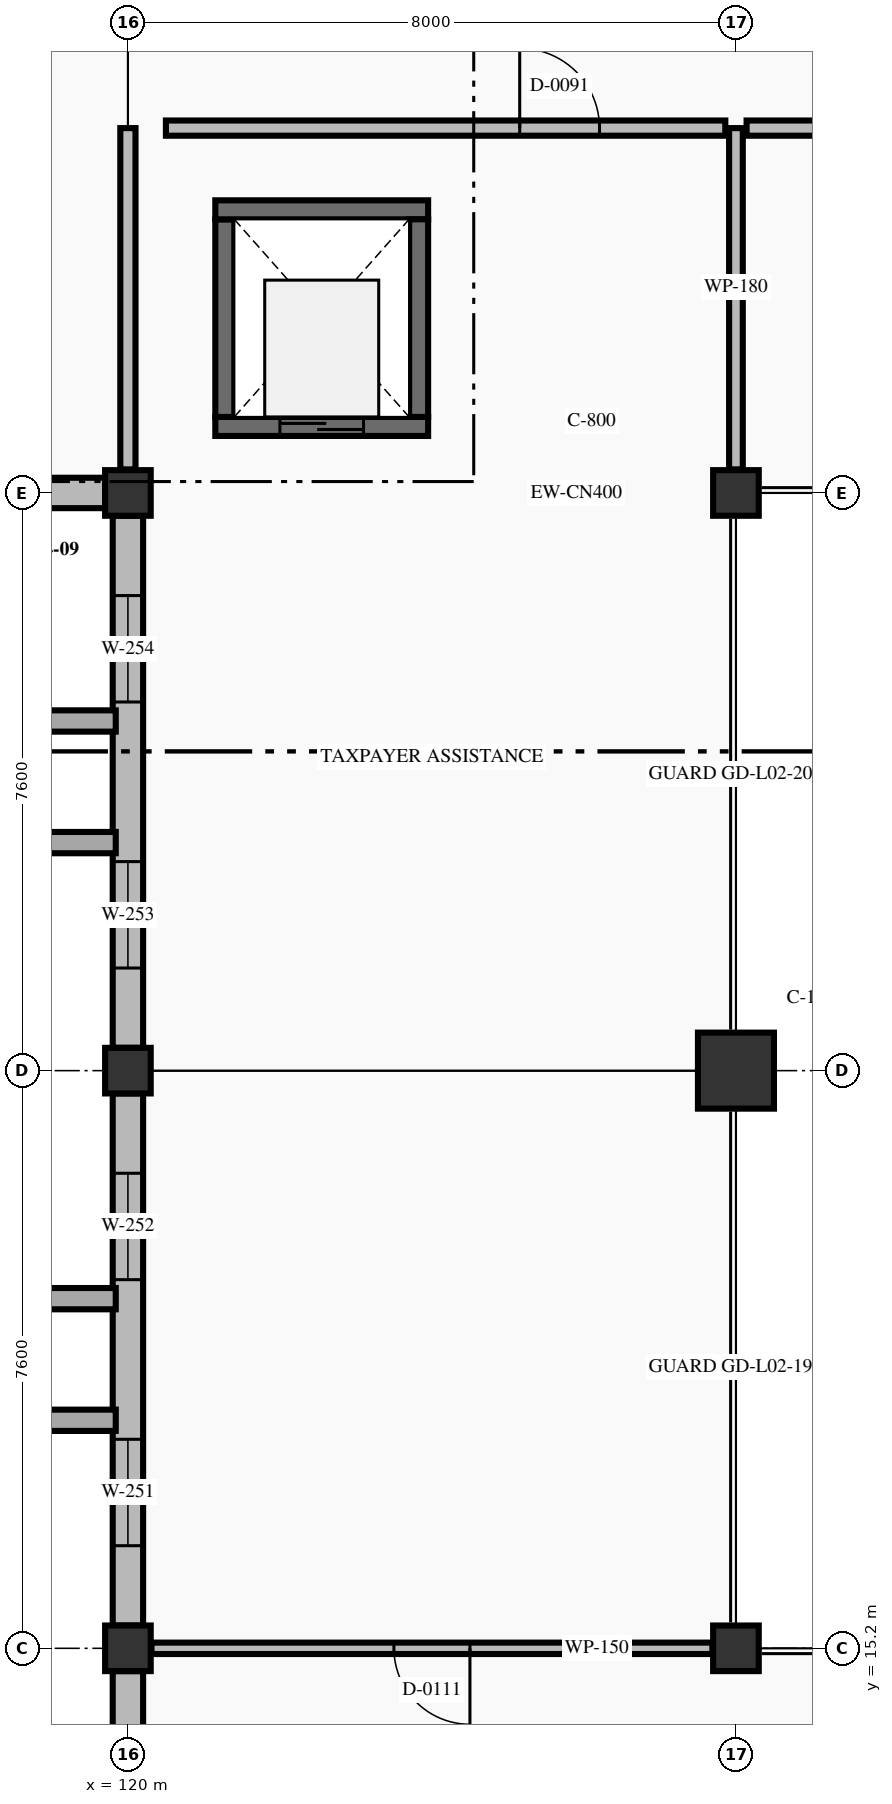
"""IFC4 building model, lengths in metres.
Left out: names, types, materials, properties, quantities, classifications, styles, units other than length and angle.
Written with IfcOpenShell. Run it as: python <this file> out.ifc"""

import sys

from ifc_helpers import new_model, si_unit, direction, frame, frame_2d, origin, origin_2d, place, context, subcontext, project, spatial, rectangle, extrude, element, fill, save


model = new_model("IFC4")
c1 = context("Model", 3, precision=1e-05, world=origin(), true_north=direction((0.0, 1.0)))
c2 = subcontext(c1, "Body", "Model", "MODEL_VIEW")
j1 = project(units=[si_unit("LENGTHUNIT", "METRE"), si_unit("PLANEANGLEUNIT", "RADIAN")], contexts=[c1])
p1 = place(None, origin())
s1 = spatial("IfcSite", under=j1, at=p1, CompositionType="ELEMENT")
p2 = place(p1, origin())
s2 = spatial("IfcBuilding", under=s1, at=p2, CompositionType="ELEMENT")
p3 = place(p2, frame((0.0, 0.0, 5.4)))
s3 = spatial("IfcBuildingStorey", under=s2, at=p3, CompositionType="ELEMENT", Elevation=5.4)
for number, where, z_axis, x_axis in (
    (1, (120.0, 15.2, 0.0), (0.0, 0.0, 1.0), (1.0, 0.0, 0.0)),
    (2, (120.0, 22.8, 0.0), (0.0, 0.0, 1.0), (1.0, 0.0, 0.0)),
    (3, (120.0, 30.4, 0.0), (0.0, 0.0, 1.0), (1.0, 0.0, 0.0)),
    (4, (128.0, 15.2, 0.0), (0.0, 0.0, 1.0), (1.0, 0.0, 0.0)),
):
    element("IfcColumn", number, at=place(p3, frame(where, z_axis=z_axis, x_axis=x_axis)), inside=s3, PredefinedType="COLUMN", context=c2, shape_type="SweptSolid", body=[
        extrude(rectangle(XDim=0.6, YDim=0.6, at=origin_2d()), origin(), (0.0, 0.0, 1.0), 4.8),
    ])
p4 = place(p3, frame((128.0, 22.8, 0.0), z_axis=(0.0, 0.0, 1.0), x_axis=(1.0, 0.0, 0.0)))
e5 = element("IfcColumn", 5, at=p4, inside=s3, PredefinedType="COLUMN", context=c2, shape_type="SweptSolid", body=[
    extrude(rectangle(XDim=1.0, YDim=1.0, at=origin_2d()), origin(), (0.0, 0.0, 1.0), 4.8),
])
p5 = place(p3, frame((128.0, 30.4, 0.0), z_axis=(0.0, 0.0, 1.0), x_axis=(1.0, 0.0, 0.0)))
e6 = element("IfcColumn", 6, at=p5, inside=s3, PredefinedType="COLUMN", context=c2, shape_type="SweptSolid", body=[
    extrude(rectangle(XDim=0.6, YDim=0.6, at=origin_2d()), origin(), (0.0, 0.0, 1.0), 4.8),
])
p6 = place(p3, frame((120.0, 7.9, 0.0), z_axis=(0.0, 0.0, 1.0), x_axis=(0.0, 1.0, 0.0)))
e7 = element("IfcWall", 7, at=p6, inside=s3, PredefinedType="STANDARD", context=c2, shape_type="SweptSolid", body=[
    extrude(rectangle(XDim=7.0, YDim=0.4, at=frame_2d((3.5, 0.0))), origin(), (0.0, 0.0, 1.0), 3.87),
])
p7 = place(p6, frame((1.05, 0.0, 0.9)))
e8 = element("IfcOpeningElement", 8, at=p7, cuts=e7, PredefinedType="OPENING", context=c2, shape_type="SweptSolid", body=[
    extrude(rectangle(XDim=1.4, YDim=2.05, at=frame_2d((0.7, 1.025))), frame((0.0, 0.21, 0.0), z_axis=(0.0, -1.0, 0.0), x_axis=(1.0, 0.0, 0.0)), (0.0, 0.0, 1.0), 0.42),
])
p8 = place(p6, frame((4.55, 0.0, 0.9)))
e9 = element("IfcOpeningElement", 9, at=p8, cuts=e7, PredefinedType="OPENING", context=c2, shape_type="SweptSolid", body=[
    extrude(rectangle(XDim=1.4, YDim=2.05, at=frame_2d((0.7, 1.025))), frame((0.0, 0.21, 0.0), z_axis=(0.0, -1.0, 0.0), x_axis=(1.0, 0.0, 0.0)), (0.0, 0.0, 1.0), 0.42),
])
p9 = place(p3, frame((120.0, 15.5, 0.0), z_axis=(0.0, 0.0, 1.0), x_axis=(0.0, 1.0, 0.0)))
e10 = element("IfcWall", 10, at=p9, inside=s3, PredefinedType="STANDARD", context=c2, shape_type="SweptSolid", body=[
    extrude(rectangle(XDim=7.0, YDim=0.4, at=frame_2d((3.5, 0.0))), origin(), (0.0, 0.0, 1.0), 3.87),
])
p10 = place(p9, frame((1.05, 0.0, 0.9)))
e11 = element("IfcOpeningElement", 11, at=p10, cuts=e10, PredefinedType="OPENING", context=c2, shape_type="SweptSolid", body=[
    extrude(rectangle(XDim=1.4, YDim=2.05, at=frame_2d((0.7, 1.025))), frame((0.0, 0.21, 0.0), z_axis=(0.0, -1.0, 0.0), x_axis=(1.0, 0.0, 0.0)), (0.0, 0.0, 1.0), 0.42),
])
p11 = place(p9, frame((4.55, 0.0, 0.9)))
e12 = element("IfcOpeningElement", 12, at=p11, cuts=e10, PredefinedType="OPENING", context=c2, shape_type="SweptSolid", body=[
    extrude(rectangle(XDim=1.4, YDim=2.05, at=frame_2d((0.7, 1.025))), frame((0.0, 0.21, 0.0), z_axis=(0.0, -1.0, 0.0), x_axis=(1.0, 0.0, 0.0)), (0.0, 0.0, 1.0), 0.42),
])
p12 = place(p3, frame((120.0, 23.1, 0.0), z_axis=(0.0, 0.0, 1.0), x_axis=(0.0, 1.0, 0.0)))
e13 = element("IfcWall", 13, at=p12, inside=s3, PredefinedType="STANDARD", context=c2, shape_type="SweptSolid", body=[
    extrude(rectangle(XDim=7.0, YDim=0.4, at=frame_2d((3.5, 0.0))), origin(), (0.0, 0.0, 1.0), 3.87),
])
p13 = place(p12, frame((1.05, 0.0, 0.9)))
e14 = element("IfcOpeningElement", 14, at=p13, cuts=e13, PredefinedType="OPENING", context=c2, shape_type="SweptSolid", body=[
    extrude(rectangle(XDim=1.4, YDim=2.05, at=frame_2d((0.7, 1.025))), frame((0.0, 0.21, 0.0), z_axis=(0.0, -1.0, 0.0), x_axis=(1.0, 0.0, 0.0)), (0.0, 0.0, 1.0), 0.42),
])
p14 = place(p12, frame((4.55, 0.0, 0.9)))
e15 = element("IfcOpeningElement", 15, at=p14, cuts=e13, PredefinedType="OPENING", context=c2, shape_type="SweptSolid", body=[
    extrude(rectangle(XDim=1.4, YDim=2.05, at=frame_2d((0.7, 1.025))), frame((0.0, 0.21, 0.0), z_axis=(0.0, -1.0, 0.0), x_axis=(1.0, 0.0, 0.0)), (0.0, 0.0, 1.0), 0.42),
])
p15 = place(p3, frame((119.7, 30.4, 0.0), z_axis=(0.0, 0.0, 1.0), x_axis=(-1.0, 0.0, 0.0)))
e16 = element("IfcWall", 16, at=p15, inside=s3, PredefinedType="STANDARD", context=c2, shape_type="SweptSolid", body=[
    extrude(rectangle(XDim=7.3, YDim=0.4, at=frame_2d((3.65, 0.0))), origin(), (0.0, 0.0, 1.0), 3.85),
])
p16 = place(p15, frame((1.025, 0.0, 0.9)))
e17 = element("IfcOpeningElement", 17, at=p16, cuts=e16, PredefinedType="OPENING", context=c2, shape_type="SweptSolid", body=[
    extrude(rectangle(XDim=1.6, YDim=2.25, at=frame_2d((0.8, 1.125))), frame((0.0, 0.21, 0.0), z_axis=(0.0, -1.0, 0.0), x_axis=(1.0, 0.0, 0.0)), (0.0, 0.0, 1.0), 0.42),
])
p17 = place(p15, frame((4.675, 0.0, 0.9)))
e18 = element("IfcOpeningElement", 18, at=p17, cuts=e16, PredefinedType="OPENING", context=c2, shape_type="SweptSolid", body=[
    extrude(rectangle(XDim=1.6, YDim=2.25, at=frame_2d((0.8, 1.125))), frame((0.0, 0.21, 0.0), z_axis=(0.0, -1.0, 0.0), x_axis=(1.0, 0.0, 0.0)), (0.0, 0.0, 1.0), 0.42),
])
p18 = place(p3, frame((123.95, 31.275, 0.0), z_axis=(0.0, 0.0, 1.0), x_axis=(-1.0, 0.0, 0.0)))
e19 = element("IfcWall", 19, at=p18, inside=s3, PredefinedType="SHEAR", context=c2, shape_type="SweptSolid", body=[
    extrude(rectangle(XDim=2.8, YDim=0.25, at=frame_2d((1.4, 0.0))), origin(), (0.0, 0.0, 1.0), 4.8),
])
p19 = place(p18, frame((0.85, 0.0, 0.0)))
e20 = element("IfcOpeningElement", 20, at=p19, cuts=e19, PredefinedType="OPENING", context=c2, shape_type="SweptSolid", body=[
    extrude(rectangle(XDim=1.1, YDim=2.15, at=frame_2d((0.55, 1.075))), frame((0.0, 0.135, 0.0), z_axis=(0.0, -1.0, 0.0), x_axis=(1.0, 0.0, 0.0)), (0.0, 0.0, 1.0), 0.27),
])
p20 = place(p3, frame((121.275, 31.4, 0.0), z_axis=(0.0, 0.0, 1.0), x_axis=(0.0, 1.0, 0.0)))
e21 = element("IfcWall", 21, at=p20, inside=s3, PredefinedType="SHEAR", context=c2, shape_type="SweptSolid", body=[
    extrude(rectangle(XDim=2.6, YDim=0.25, at=frame_2d((1.3, 0.0))), origin(), (0.0, 0.0, 1.0), 4.8),
])
p21 = place(p3, frame((121.15, 34.125, 0.0), z_axis=(0.0, 0.0, 1.0), x_axis=(1.0, 0.0, 0.0)))
e22 = element("IfcWall", 22, at=p21, inside=s3, PredefinedType="SHEAR", context=c2, shape_type="SweptSolid", body=[
    extrude(rectangle(XDim=2.8, YDim=0.25, at=frame_2d((1.4, 0.0))), origin(), (0.0, 0.0, 1.0), 4.8),
])
p22 = place(p3, frame((123.825, 34.0, 0.0), z_axis=(0.0, 0.0, 1.0), x_axis=(0.0, -1.0, 0.0)))
e23 = element("IfcWall", 23, at=p22, inside=s3, PredefinedType="SHEAR", context=c2, shape_type="SweptSolid", body=[
    extrude(rectangle(XDim=2.6, YDim=0.25, at=frame_2d((1.3, 0.0))), origin(), (0.0, 0.0, 1.0), 4.8),
])
p23 = place(p3, frame((128.0, 30.71, 0.0), z_axis=(0.0, 0.0, 1.0), x_axis=(0.0, 1.0, 0.0)))
e24 = element("IfcWall", 24, at=p23, inside=s3, PredefinedType="PARTITIONING", context=c2, shape_type="SweptSolid", body=[
    extrude(rectangle(XDim=4.49, YDim=0.18, at=frame_2d((2.245, 0.0))), origin(), (0.0, 0.0, 1.0), 3.87),
])
p24 = place(p3, frame((128.14, 35.2, 0.0), z_axis=(0.0, 0.0, 1.0), x_axis=(1.0, 0.0, 0.0)))
e25 = element("IfcWall", 25, at=p24, inside=s3, PredefinedType="STANDARD", context=c2, shape_type="SweptSolid", body=[
    extrude(rectangle(XDim=15.72, YDim=0.2, at=frame_2d((7.86, 0.0))), origin(), (0.0, 0.0, 1.0), 4.45),
])
p25 = place(p24, frame((7.06, 0.0, 0.0)))
e26 = element("IfcOpeningElement", 26, at=p25, cuts=e25, PredefinedType="OPENING", context=c2, shape_type="SweptSolid", body=[
    extrude(rectangle(XDim=1.6, YDim=2.3, at=frame_2d((0.8, 1.15))), frame((0.0, 0.11, 0.0), z_axis=(0.0, -1.0, 0.0), x_axis=(1.0, 0.0, 0.0)), (0.0, 0.0, 1.0), 0.22),
])
p26 = place(p24, frame((8.81, 0.0, 0.0)))
e27 = element("IfcOpeningElement", 27, at=p26, cuts=e25, PredefinedType="OPENING", context=c2, shape_type="SweptSolid", body=[
    extrude(rectangle(XDim=1.6, YDim=2.3, at=frame_2d((0.8, 1.15))), frame((0.0, 0.11, 0.0), z_axis=(0.0, -1.0, 0.0), x_axis=(1.0, 0.0, 0.0)), (0.0, 0.0, 1.0), 0.22),
])
p27 = place(p3, frame((127.69, 15.2, 0.0), z_axis=(0.0, 0.0, 1.0), x_axis=(-1.0, 0.0, 0.0)))
e28 = element("IfcWall", 28, at=p27, inside=s3, PredefinedType="PARTITIONING", context=c2, shape_type="SweptSolid", body=[
    extrude(rectangle(XDim=7.38, YDim=0.15, at=frame_2d((3.69, 0.0))), origin(), (0.0, 0.0, 1.0), 3.8),
])
p28 = place(p27, frame((3.19, 0.0, 0.0)))
e29 = element("IfcOpeningElement", 29, at=p28, cuts=e28, PredefinedType="OPENING", context=c2, shape_type="SweptSolid", body=[
    extrude(rectangle(XDim=1.0, YDim=2.15, at=frame_2d((0.5, 1.075))), frame((0.0, 0.085, 0.0), z_axis=(0.0, -1.0, 0.0), x_axis=(1.0, 0.0, 0.0)), (0.0, 0.0, 1.0), 0.17),
])
p29 = place(p3, frame((120.0, 30.71, 0.0), z_axis=(0.0, 0.0, 1.0), x_axis=(0.0, 1.0, 0.0)))
e30 = element("IfcWall", 30, at=p29, inside=s3, PredefinedType="STANDARD", context=c2, shape_type="SweptSolid", body=[
    extrude(rectangle(XDim=4.49, YDim=0.2, at=frame_2d((2.245, 0.0))), origin(), (0.0, 0.0, 1.0), 3.87),
])
p30 = place(p3, frame((120.5, 35.2, 0.0), z_axis=(0.0, 0.0, 1.0), x_axis=(1.0, 0.0, 0.0)))
e31 = element("IfcWall", 31, at=p30, inside=s3, PredefinedType="STANDARD", context=c2, shape_type="SweptSolid", body=[
    extrude(rectangle(XDim=7.36, YDim=0.2, at=frame_2d((3.68, 0.0))), origin(), (0.0, 0.0, 1.0), 4.45),
])
p31 = place(p30, frame((4.655, 0.0, 0.0)))
e32 = element("IfcOpeningElement", 32, at=p31, cuts=e31, PredefinedType="OPENING", context=c2, shape_type="SweptSolid", body=[
    extrude(rectangle(XDim=1.05, YDim=2.15, at=frame_2d((0.525, 1.075))), frame((0.0, 0.11, 0.0), z_axis=(0.0, -1.0, 0.0), x_axis=(1.0, 0.0, 0.0)), (0.0, 0.0, 1.0), 0.22),
])
p32 = place(p10, origin())
e33 = element("IfcWindow", 33, at=p32, inside=s3, PartitioningType="DOUBLE_PANEL_VERTICAL", PredefinedType="WINDOW", context=c2, shape_type="SweptSolid", body=[
    extrude(rectangle(XDim=1.4, YDim=2.05, at=frame_2d((0.7, 1.025))), frame((0.0, 0.03, 0.0), z_axis=(0.0, -1.0, 0.0), x_axis=(1.0, 0.0, 0.0)), (0.0, 0.0, 1.0), 0.06),
])
fill(e11, e33)
p33 = place(p11, origin())
e34 = element("IfcWindow", 34, at=p33, inside=s3, PartitioningType="DOUBLE_PANEL_VERTICAL", PredefinedType="WINDOW", context=c2, shape_type="SweptSolid", body=[
    extrude(rectangle(XDim=1.4, YDim=2.05, at=frame_2d((0.7, 1.025))), frame((0.0, 0.03, 0.0), z_axis=(0.0, -1.0, 0.0), x_axis=(1.0, 0.0, 0.0)), (0.0, 0.0, 1.0), 0.06),
])
fill(e12, e34)
p34 = place(p13, origin())
e35 = element("IfcWindow", 35, at=p34, inside=s3, PartitioningType="DOUBLE_PANEL_VERTICAL", PredefinedType="WINDOW", context=c2, shape_type="SweptSolid", body=[
    extrude(rectangle(XDim=1.4, YDim=2.05, at=frame_2d((0.7, 1.025))), frame((0.0, 0.03, 0.0), z_axis=(0.0, -1.0, 0.0), x_axis=(1.0, 0.0, 0.0)), (0.0, 0.0, 1.0), 0.06),
])
fill(e14, e35)
p35 = place(p14, origin())
e36 = element("IfcWindow", 36, at=p35, inside=s3, PartitioningType="DOUBLE_PANEL_VERTICAL", PredefinedType="WINDOW", context=c2, shape_type="SweptSolid", body=[
    extrude(rectangle(XDim=1.4, YDim=2.05, at=frame_2d((0.7, 1.025))), frame((0.0, 0.03, 0.0), z_axis=(0.0, -1.0, 0.0), x_axis=(1.0, 0.0, 0.0)), (0.0, 0.0, 1.0), 0.06),
])
fill(e15, e36)
p36 = place(p19, origin())
e37 = element("IfcDoor", 37, at=p36, inside=s3, OperationType="DOUBLE_DOOR_SLIDING", PredefinedType="DOOR", context=c2, shape_type="SweptSolid", body=[
    extrude(rectangle(XDim=1.1, YDim=2.15, at=frame_2d((0.55, 1.075))), frame((0.0, 0.025, 0.0), z_axis=(0.0, -1.0, 0.0), x_axis=(1.0, 0.0, 0.0)), (0.0, 0.0, 1.0), 0.05),
])
fill(e20, e37)
p37 = place(p31, origin())
e38 = element("IfcDoor", 38, at=p37, inside=s3, OperationType="SINGLE_SWING_LEFT", PredefinedType="DOOR", context=c2, shape_type="SweptSolid", body=[
    extrude(rectangle(XDim=1.05, YDim=2.15, at=frame_2d((0.525, 1.075))), frame((0.0, 0.025, 0.0), z_axis=(0.0, -1.0, 0.0), x_axis=(1.0, 0.0, 0.0)), (0.0, 0.0, 1.0), 0.05),
])
fill(e32, e38)
p38 = place(p28, origin())
e39 = element("IfcDoor", 39, at=p38, inside=s3, OperationType="SINGLE_SWING_LEFT", PredefinedType="DOOR", context=c2, shape_type="SweptSolid", body=[
    extrude(rectangle(XDim=1.0, YDim=2.15, at=frame_2d((0.5, 1.075))), frame((0.0, 0.025, 0.0), z_axis=(0.0, -1.0, 0.0), x_axis=(1.0, 0.0, 0.0)), (0.0, 0.0, 1.0), 0.05),
])
fill(e29, e39)
save(model, sys.argv[1])
